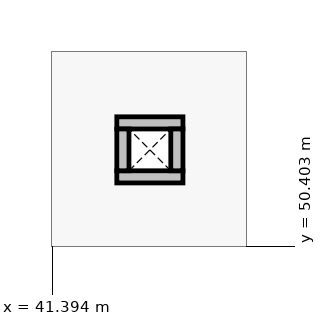
"""IFC4 building model, lengths in metres.
Left out: names, types, materials, properties, quantities, classifications, styles, units other than length and angle.
Written with IfcOpenShell. Run it as: python <this file> out.ifc"""

import sys

from ifc_helpers import new_model, si_unit, direction, frame, frame_2d, origin, place, context, subcontext, project, spatial, rectangle, extrude, element, save


model = new_model("IFC4")
c1 = context("Model", 3, precision=1e-05, world=origin(), true_north=direction((0.0, 1.0)))
c2 = subcontext(c1, "Body", "Model", "MODEL_VIEW")
j1 = project(units=[si_unit("LENGTHUNIT", "METRE"), si_unit("PLANEANGLEUNIT", "RADIAN")], contexts=[c1])
p1 = place(None, origin())
s1 = spatial("IfcSite", under=j1, at=p1, CompositionType="ELEMENT")
p2 = place(p1, origin())
s2 = spatial("IfcBuilding", under=s1, at=p2, CompositionType="ELEMENT")
p3 = place(p2, frame((0.0, 0.0, 4.8)))
s3 = spatial("IfcBuildingStorey", under=s2, at=p3, CompositionType="ELEMENT", Elevation=4.8)
for number, where, z_axis, x_axis in (
    (1, (42.24, 51.32, 0.0), (0.0, 0.0, 1.0), (1.0, 0.0, 0.0)),
    (2, (42.24, 52.03, 0.0), (0.0, 0.0, 1.0), (1.0, 0.0, 0.0)),
):
    element("IfcWall", number, at=place(p3, frame(where, z_axis=z_axis, x_axis=x_axis)), inside=s3, PredefinedType="PARTITIONING", context=c2, shape_type="SweptSolid", body=[
        extrude(rectangle(XDim=0.87, YDim=0.16, at=frame_2d((0.435, 0.0))), origin(), (0.0, 0.0, 1.0), 3.35),
    ])
for number, where, z_axis, x_axis in (
    (3, (42.32, 51.4, 0.0), (0.0, 0.0, 1.0), (0.0, 1.0, 0.0)),
    (4, (43.03, 51.4, 0.0), (0.0, 0.0, 1.0), (0.0, 1.0, 0.0)),
):
    element("IfcWall", number, at=place(p3, frame(where, z_axis=z_axis, x_axis=x_axis)), inside=s3, PredefinedType="PARTITIONING", context=c2, shape_type="SweptSolid", body=[
        extrude(rectangle(XDim=0.55, YDim=0.16, at=frame_2d((0.275, 0.0))), origin(), (0.0, 0.0, 1.0), 3.35),
    ])
save(model, sys.argv[1])
